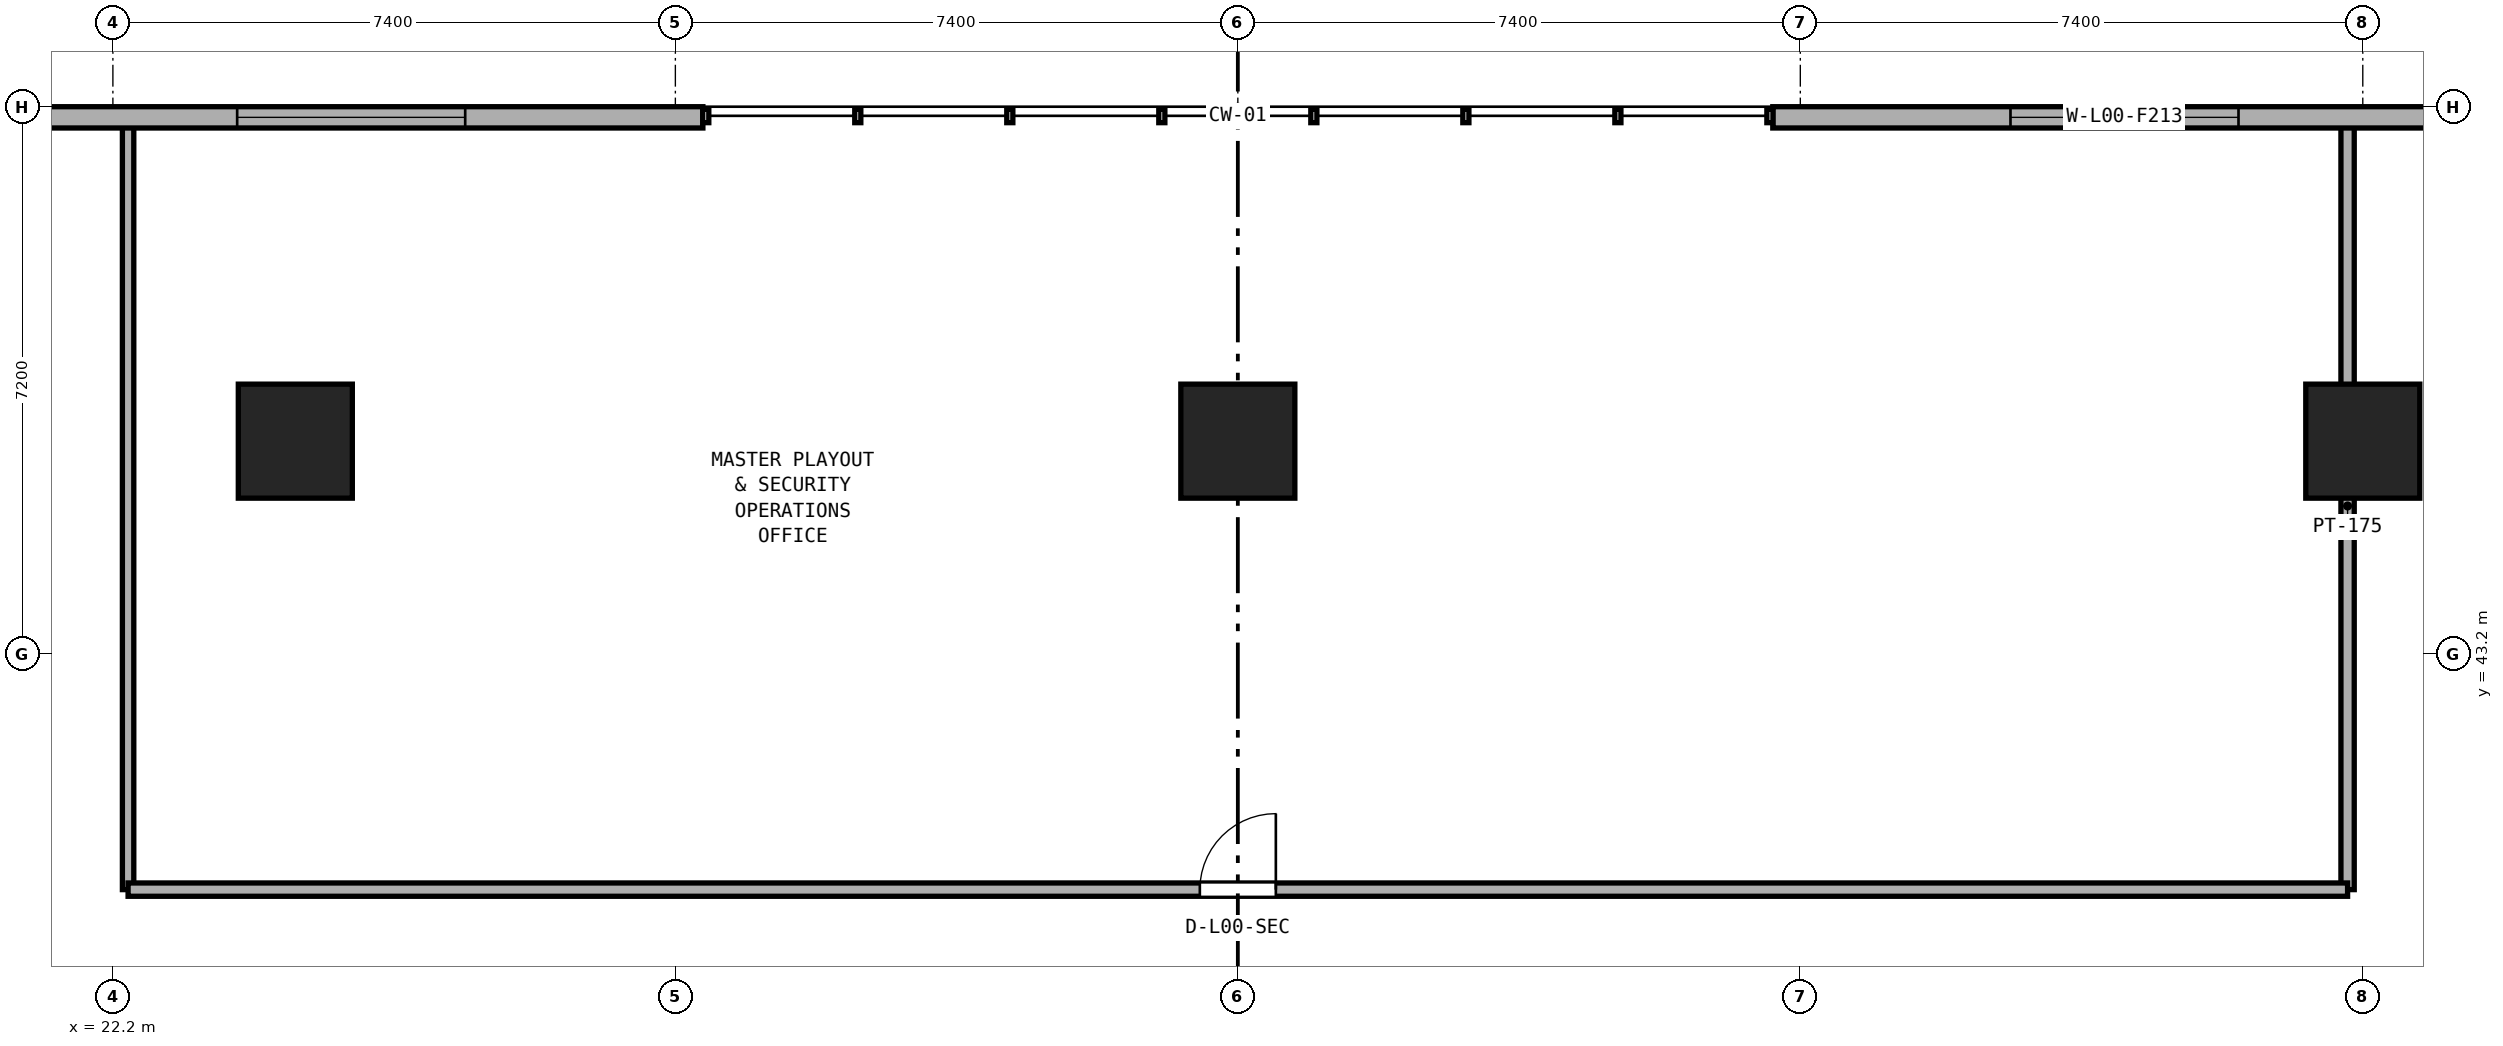
"""IFC4 building model, lengths in metres.
Left out: names, types, materials, properties, quantities, classifications, styles, units other than length and angle.
Written with IfcOpenShell. Run it as: python <this file> out.ifc"""

import sys

from ifc_helpers import new_model, si_unit, direction, frame, frame_2d, origin, origin_2d, place, context, subcontext, project, spatial, rectangle, extrude, element, fill, save


model = new_model("IFC4")
c1 = context("Model", 3, precision=1e-05, world=origin(), true_north=direction((0.0, 1.0)))
c2 = subcontext(c1, "Body", "Model", "MODEL_VIEW")
j1 = project(units=[si_unit("LENGTHUNIT", "METRE"), si_unit("PLANEANGLEUNIT", "RADIAN")], contexts=[c1])
p1 = place(None, origin())
s1 = spatial("IfcSite", under=j1, at=p1, CompositionType="ELEMENT")
p2 = place(p1, origin())
s2 = spatial("IfcBuilding", under=s1, at=p2, CompositionType="ELEMENT")
p3 = place(p2, origin())
s3 = spatial("IfcBuildingStorey", under=s2, at=p3, CompositionType="ELEMENT", Elevation=0.0)
for number, where, z_axis, x_axis in (
    (1, (24.6, 46.0, 0.0), (0.0, 0.0, 1.0), (1.0, 0.0, 0.0)),
    (2, (37.0, 46.0, 0.0), (0.0, 0.0, 1.0), (1.0, 0.0, 0.0)),
    (3, (51.8, 46.0, 0.0), (0.0, 0.0, 1.0), (1.0, 0.0, 0.0)),
):
    element("IfcColumn", number, at=place(p3, frame(where, z_axis=z_axis, x_axis=x_axis)), inside=s3, PredefinedType="COLUMN", context=c2, shape_type="SweptSolid", body=[
        extrude(rectangle(XDim=1.5, YDim=1.5, at=origin_2d()), origin(), (0.0, 0.0, 1.0), 5.0),
    ])
p4 = place(p3, frame((51.6, 40.1, 0.0), z_axis=(0.0, 0.0, 1.0), x_axis=(0.0, 1.0, 0.0)))
e4 = element("IfcWall", 4, at=p4, inside=s3, PredefinedType="PARTITIONING", context=c2, shape_type="SweptSolid", body=[
    extrude(rectangle(XDim=10.095, YDim=0.175, at=frame_2d((5.047, 0.0))), origin(), (0.0, 0.0, 1.0), 3.89),
])
p5 = place(p3, frame((22.4, 40.1, 0.0), z_axis=(0.0, 0.0, 1.0), x_axis=(0.0, 1.0, 0.0)))
e5 = element("IfcWall", 5, at=p5, inside=s3, PredefinedType="PARTITIONING", context=c2, shape_type="SweptSolid", body=[
    extrude(rectangle(XDim=10.095, YDim=0.15, at=frame_2d((5.047, 0.0))), origin(), (0.0, 0.0, 1.0), 4.66),
])
p6 = place(p3, frame((22.4, 40.1, 0.0), z_axis=(0.0, 0.0, 1.0), x_axis=(1.0, 0.0, 0.0)))
e6 = element("IfcWall", 6, at=p6, inside=s3, PredefinedType="PARTITIONING", context=c2, shape_type="SweptSolid", body=[
    extrude(rectangle(XDim=29.2, YDim=0.175, at=frame_2d((14.6, 0.0))), origin(), (0.0, 0.0, 1.0), 4.66),
])
p7 = place(p6, frame((14.1, 0.0, 0.0)))
e7 = element("IfcOpeningElement", 7, at=p7, cuts=e6, PredefinedType="OPENING", context=c2, shape_type="SweptSolid", body=[
    extrude(rectangle(XDim=1.0, YDim=2.12, at=frame_2d((0.5, 1.06))), frame((0.0, 0.097, 0.0), z_axis=(0.0, -1.0, 0.0), x_axis=(1.0, 0.0, 0.0)), (0.0, 0.0, 1.0), 0.195),
])
p8 = place(p3, frame((69.8, 50.26, 0.0), z_axis=(0.0, 0.0, 1.0), x_axis=(-1.0, 0.0, 0.0)))
e8 = element("IfcWall", 8, at=p8, inside=s3, PredefinedType="STANDARD", context=c2, shape_type="SweptSolid", body=[
    extrude(rectangle(XDim=25.762, YDim=0.28, at=frame_2d((12.881, 0.0))), origin(), (0.0, 0.0, 1.0), 4.66),
])
p9 = place(p8, frame((3.127, 0.0, 0.9)))
e9 = element("IfcOpeningElement", 9, at=p9, cuts=e8, PredefinedType="OPENING", context=c2, shape_type="SweptSolid", body=[
    extrude(rectangle(XDim=3.0, YDim=2.2, at=frame_2d((1.5, 1.1))), frame((0.0, 0.15, 0.0), z_axis=(0.0, -1.0, 0.0), x_axis=(1.0, 0.0, 0.0)), (0.0, 0.0, 1.0), 0.3),
])
p10 = place(p8, frame((11.381, 0.0, 0.9)))
e10 = element("IfcOpeningElement", 10, at=p10, cuts=e8, PredefinedType="OPENING", context=c2, shape_type="SweptSolid", body=[
    extrude(rectangle(XDim=3.0, YDim=2.2, at=frame_2d((1.5, 1.1))), frame((0.0, 0.15, 0.0), z_axis=(0.0, -1.0, 0.0), x_axis=(1.0, 0.0, 0.0)), (0.0, 0.0, 1.0), 0.3),
])
p11 = place(p8, frame((19.635, 0.0, 0.9)))
e11 = element("IfcOpeningElement", 11, at=p11, cuts=e8, PredefinedType="OPENING", context=c2, shape_type="SweptSolid", body=[
    extrude(rectangle(XDim=3.0, YDim=2.2, at=frame_2d((1.5, 1.1))), frame((0.0, 0.15, 0.0), z_axis=(0.0, -1.0, 0.0), x_axis=(1.0, 0.0, 0.0)), (0.0, 0.0, 1.0), 0.3),
])
p12 = place(p3, frame((29.962, 50.26, 0.0), z_axis=(0.0, 0.0, 1.0), x_axis=(-1.0, 0.0, 0.0)))
e12 = element("IfcWall", 12, at=p12, inside=s3, PredefinedType="STANDARD", context=c2, shape_type="SweptSolid", body=[
    extrude(rectangle(XDim=25.762, YDim=0.28, at=frame_2d((12.881, 0.0))), origin(), (0.0, 0.0, 1.0), 4.66),
])
p13 = place(p12, frame((3.127, 0.0, 0.9)))
e13 = element("IfcOpeningElement", 13, at=p13, cuts=e12, PredefinedType="OPENING", context=c2, shape_type="SweptSolid", body=[
    extrude(rectangle(XDim=3.0, YDim=2.2, at=frame_2d((1.5, 1.1))), frame((0.0, 0.15, 0.0), z_axis=(0.0, -1.0, 0.0), x_axis=(1.0, 0.0, 0.0)), (0.0, 0.0, 1.0), 0.3),
])
p14 = place(p12, frame((11.381, 0.0, 0.9)))
e14 = element("IfcOpeningElement", 14, at=p14, cuts=e12, PredefinedType="OPENING", context=c2, shape_type="SweptSolid", body=[
    extrude(rectangle(XDim=3.0, YDim=2.2, at=frame_2d((1.5, 1.1))), frame((0.0, 0.15, 0.0), z_axis=(0.0, -1.0, 0.0), x_axis=(1.0, 0.0, 0.0)), (0.0, 0.0, 1.0), 0.3),
])
p15 = place(p12, frame((19.635, 0.0, 0.9)))
e15 = element("IfcOpeningElement", 15, at=p15, cuts=e12, PredefinedType="OPENING", context=c2, shape_type="SweptSolid", body=[
    extrude(rectangle(XDim=3.0, YDim=2.2, at=frame_2d((1.5, 1.1))), frame((0.0, 0.15, 0.0), z_axis=(0.0, -1.0, 0.0), x_axis=(1.0, 0.0, 0.0)), (0.0, 0.0, 1.0), 0.3),
])
p16 = place(p7, origin())
e16 = element("IfcDoor", 16, at=p16, inside=s3, OperationType="SINGLE_SWING_RIGHT", PredefinedType="DOOR", context=c2, shape_type="SweptSolid", body=[
    extrude(rectangle(XDim=1.0, YDim=2.12, at=frame_2d((0.5, 1.06))), frame((0.0, 0.025, 0.0), z_axis=(0.0, -1.0, 0.0), x_axis=(1.0, 0.0, 0.0)), (0.0, 0.0, 1.0), 0.05),
])
fill(e7, e16)
p17 = place(p11, origin())
e17 = element("IfcWindow", 17, at=p17, inside=s3, PartitioningType="SINGLE_PANEL", PredefinedType="WINDOW", context=c2, shape_type="SweptSolid", body=[
    extrude(rectangle(XDim=3.0, YDim=2.2, at=frame_2d((1.5, 1.1))), frame((0.0, 0.03, 0.0), z_axis=(0.0, -1.0, 0.0), x_axis=(1.0, 0.0, 0.0)), (0.0, 0.0, 1.0), 0.06),
])
fill(e11, e17)
p18 = place(p13, origin())
e18 = element("IfcWindow", 18, at=p18, inside=s3, PartitioningType="SINGLE_PANEL", PredefinedType="WINDOW", context=c2, shape_type="SweptSolid", body=[
    extrude(rectangle(XDim=3.0, YDim=2.2, at=frame_2d((1.5, 1.1))), frame((0.0, 0.03, 0.0), z_axis=(0.0, -1.0, 0.0), x_axis=(1.0, 0.0, 0.0)), (0.0, 0.0, 1.0), 0.06),
])
fill(e13, e18)
save(model, sys.argv[1])
